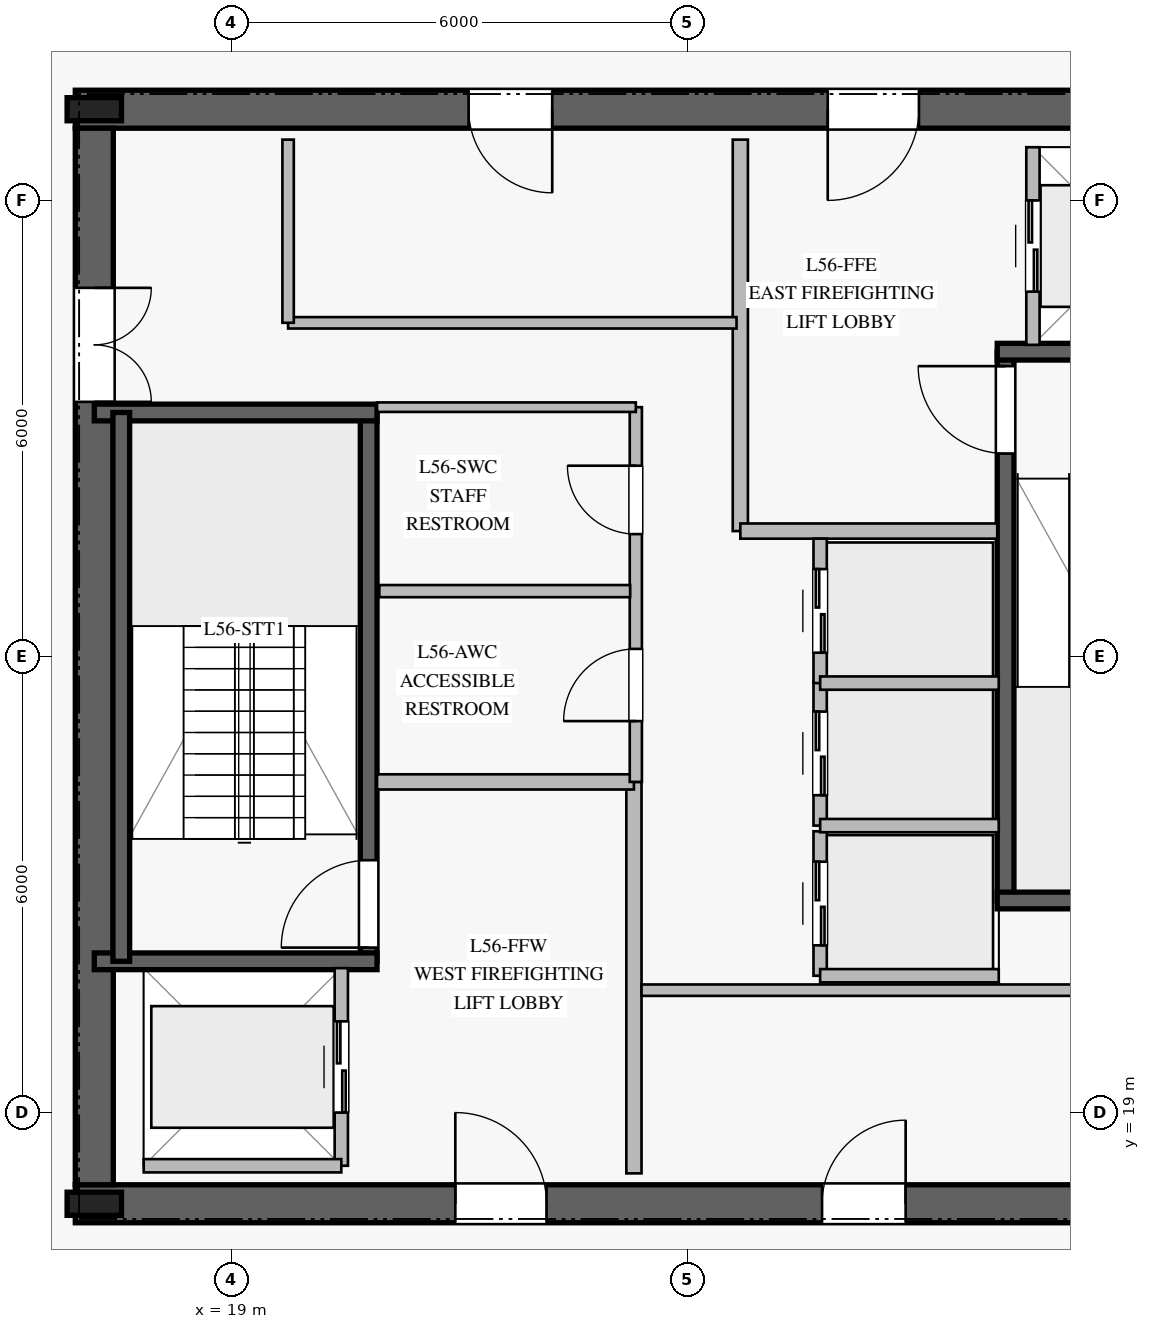
"""IFC4 building model, lengths in metres.
Left out: names, types, materials, properties, quantities, classifications, styles, units other than length and angle.
Written with IfcOpenShell. Run it as: python <this file> out.ifc"""

import sys

from ifc_helpers import new_model, si_unit, direction, frame, frame_2d, origin, origin_2d, place, context, subcontext, project, spatial, rectangle, i_section, extrude, element, fill, save


model = new_model("IFC4")
c1 = context("Model", 3, precision=1e-05, world=origin(), true_north=direction((0.0, 1.0)))
c2 = subcontext(c1, "Body", "Model", "MODEL_VIEW")
j1 = project(units=[si_unit("LENGTHUNIT", "METRE"), si_unit("PLANEANGLEUNIT", "RADIAN")], contexts=[c1])
p1 = place(None, origin())
s1 = spatial("IfcSite", under=j1, at=p1, CompositionType="ELEMENT")
p2 = place(p1, origin())
s2 = spatial("IfcBuilding", under=s1, at=p2, CompositionType="ELEMENT")
p3 = place(p2, frame((0.0, 0.0, 232.8)))
s3 = spatial("IfcBuildingStorey", under=s2, at=p3, CompositionType="ELEMENT", Elevation=232.8)
p4 = place(p3, frame((16.95, 17.8, 0.0), z_axis=(0.0, 0.0, 1.0), x_axis=(1.0, 0.0, 0.0)))
e1 = element("IfcWall", 1, at=p4, inside=s3, PredefinedType="SHEAR", context=c2, shape_type="SweptSolid", body=[
    extrude(rectangle(XDim=16.1, YDim=0.5, at=frame_2d((8.05, 0.0))), origin(), (0.0, 0.0, 1.0), 3.78),
])
p5 = place(p4, frame((5.0, 0.0, 0.0)))
e2 = element("IfcOpeningElement", 2, at=p5, cuts=e1, PredefinedType="OPENING", context=c2, shape_type="SweptSolid", body=[
    extrude(rectangle(XDim=1.2, YDim=2.25, at=frame_2d((0.6, 1.125))), frame((0.0, 0.26, 0.0), z_axis=(0.0, -1.0, 0.0), x_axis=(1.0, 0.0, 0.0)), (0.0, 0.0, 1.0), 0.52),
])
p6 = place(p4, frame((13.95, 0.0, 0.0)))
e3 = element("IfcOpeningElement", 3, at=p6, cuts=e1, PredefinedType="OPENING", context=c2, shape_type="SweptSolid", body=[
    extrude(rectangle(XDim=0.9, YDim=2.1, at=frame_2d((0.45, 1.05))), frame((0.0, 0.26, 0.0), z_axis=(0.0, -1.0, 0.0), x_axis=(1.0, 0.0, 0.0)), (0.0, 0.0, 1.0), 0.52),
])
p7 = place(p4, frame((9.825, 0.0, 0.0)))
e4 = element("IfcOpeningElement", 4, at=p7, cuts=e1, PredefinedType="OPENING", context=c2, shape_type="SweptSolid", body=[
    extrude(rectangle(XDim=1.1, YDim=2.2, at=frame_2d((0.55, 1.1))), frame((0.0, 0.26, 0.0), z_axis=(0.0, -1.0, 0.0), x_axis=(1.0, 0.0, 0.0)), (0.0, 0.0, 1.0), 0.52),
])
p8 = place(p3, frame((33.05, 32.2, 0.0), z_axis=(0.0, 0.0, 1.0), x_axis=(-1.0, 0.0, 0.0)))
e5 = element("IfcWall", 5, at=p8, inside=s3, PredefinedType="SHEAR", context=c2, shape_type="SweptSolid", body=[
    extrude(rectangle(XDim=16.1, YDim=0.5, at=frame_2d((8.05, 0.0))), origin(), (0.0, 0.0, 1.0), 3.78),
])
p9 = place(p8, frame((5.0, 0.0, 0.0)))
e6 = element("IfcOpeningElement", 6, at=p9, cuts=e5, PredefinedType="OPENING", context=c2, shape_type="SweptSolid", body=[
    extrude(rectangle(XDim=1.2, YDim=2.25, at=frame_2d((0.6, 1.125))), frame((0.0, 0.26, 0.0), z_axis=(0.0, -1.0, 0.0), x_axis=(1.0, 0.0, 0.0)), (0.0, 0.0, 1.0), 0.52),
])
p10 = place(p8, frame((9.825, 0.0, 0.0)))
e7 = element("IfcOpeningElement", 7, at=p10, cuts=e5, PredefinedType="OPENING", context=c2, shape_type="SweptSolid", body=[
    extrude(rectangle(XDim=1.1, YDim=2.2, at=frame_2d((0.55, 1.1))), frame((0.0, 0.26, 0.0), z_axis=(0.0, -1.0, 0.0), x_axis=(1.0, 0.0, 0.0)), (0.0, 0.0, 1.0), 0.52),
])
p11 = place(p3, frame((17.2, 31.95, 0.0), z_axis=(0.0, 0.0, 1.0), x_axis=(0.0, -1.0, 0.0)))
e8 = element("IfcWall", 8, at=p11, inside=s3, PredefinedType="SHEAR", context=c2, shape_type="SweptSolid", body=[
    extrude(rectangle(XDim=13.9, YDim=0.5, at=frame_2d((6.95, 0.0))), origin(), (0.0, 0.0, 1.0), 3.78),
])
p12 = place(p11, frame((2.1, 0.0, 0.0)))
e9 = element("IfcOpeningElement", 9, at=p12, cuts=e8, PredefinedType="OPENING", context=c2, shape_type="SweptSolid", body=[
    extrude(rectangle(XDim=1.5, YDim=2.2, at=frame_2d((0.75, 1.1))), frame((0.0, 0.26, 0.0), z_axis=(0.0, -1.0, 0.0), x_axis=(1.0, 0.0, 0.0)), (0.0, 0.0, 1.0), 0.52),
])
for number, where, z_axis, x_axis in (
    (10, (17.2, 17.8, 0.0), (0.0, 0.0, 1.0), (1.0, 0.0, 0.0)),
    (11, (17.2, 32.2, 0.0), (0.0, 0.0, 1.0), (1.0, 0.0, 0.0)),
):
    element("IfcColumn", number, at=place(p3, frame(where, z_axis=z_axis, x_axis=x_axis)), inside=s3, PredefinedType="COLUMN", context=c2, shape_type="SweptSolid", body=[
        extrude(i_section(OverallWidth=0.304, OverallDepth=0.716, WebThickness=0.021, FlangeThickness=0.04, at=origin_2d()), origin(), (0.0, 0.0, 1.0), 4.0),
    ])
p13 = place(p3, frame((20.81, 20.99, 0.0), z_axis=(0.0, 0.0, 1.0), x_axis=(0.0, 1.0, 0.0)))
e12 = element("IfcWall", 12, at=p13, inside=s3, PredefinedType="SOLIDWALL", context=c2, shape_type="SweptSolid", body=[
    extrude(rectangle(XDim=7.22, YDim=0.22, at=frame_2d((3.61, 0.0))), origin(), (0.0, 0.0, 1.0), 3.78),
])
p14 = place(p13, frame((0.18, 0.0, 0.0)))
e13 = element("IfcOpeningElement", 13, at=p14, cuts=e12, PredefinedType="OPENING", context=c2, shape_type="SweptSolid", body=[
    extrude(rectangle(XDim=1.15, YDim=2.2, at=frame_2d((0.575, 1.1))), frame((0.0, 0.12, 0.0), z_axis=(0.0, -1.0, 0.0), x_axis=(1.0, 0.0, 0.0)), (0.0, 0.0, 1.0), 0.24),
])
for number, where, z_axis, x_axis in (
    (14, (17.2, 20.99, 0.0), (0.0, 0.0, 1.0), (1.0, 0.0, 0.0)),
    (15, (17.2, 28.21, 0.0), (0.0, 0.0, 1.0), (1.0, 0.0, 0.0)),
):
    element("IfcWall", number, at=place(p3, frame(where, z_axis=z_axis, x_axis=x_axis)), inside=s3, PredefinedType="SOLIDWALL", context=c2, shape_type="SweptSolid", body=[
        extrude(rectangle(XDim=3.72, YDim=0.22, at=frame_2d((1.86, 0.0))), origin(), (0.0, 0.0, 1.0), 3.78),
    ])
p15 = place(p3, frame((17.555, 28.21, 0.0), z_axis=(0.0, 0.0, 1.0), x_axis=(0.0, -1.0, 0.0)))
e16 = element("IfcWall", 16, at=p15, inside=s3, PredefinedType="SOLIDWALL", context=c2, shape_type="SweptSolid", body=[
    extrude(rectangle(XDim=7.22, YDim=0.22, at=frame_2d((3.61, 0.0))), origin(), (0.0, 0.0, 1.0), 3.78),
])
p16 = place(p3, frame((29.19, 21.79, 0.0), z_axis=(0.0, 0.0, 1.0), x_axis=(0.0, 1.0, 0.0)))
e17 = element("IfcWall", 17, at=p16, inside=s3, PredefinedType="SOLIDWALL", context=c2, shape_type="SweptSolid", body=[
    extrude(rectangle(XDim=7.22, YDim=0.22, at=frame_2d((3.61, 0.0))), origin(), (0.0, 0.0, 1.0), 3.78),
])
p17 = place(p16, frame((5.88, 0.0, 0.0)))
e18 = element("IfcOpeningElement", 18, at=p17, cuts=e17, PredefinedType="OPENING", context=c2, shape_type="SweptSolid", body=[
    extrude(rectangle(XDim=1.15, YDim=2.2, at=frame_2d((0.575, 1.1))), frame((0.0, 0.12, 0.0), z_axis=(0.0, -1.0, 0.0), x_axis=(1.0, 0.0, 0.0)), (0.0, 0.0, 1.0), 0.24),
])
for number, where, z_axis, x_axis in (
    (19, (29.08, 21.79, 0.0), (0.0, 0.0, 1.0), (1.0, 0.0, 0.0)),
    (20, (29.08, 29.01, 0.0), (0.0, 0.0, 1.0), (1.0, 0.0, 0.0)),
):
    element("IfcWall", number, at=place(p3, frame(where, z_axis=z_axis, x_axis=x_axis)), inside=s3, PredefinedType="SOLIDWALL", context=c2, shape_type="SweptSolid", body=[
        extrude(rectangle(XDim=3.72, YDim=0.22, at=frame_2d((1.86, 0.0))), origin(), (0.0, 0.0, 1.0), 3.78),
    ])
p18 = place(p3, frame((24.3, 18.2, 0.0), z_axis=(0.0, 0.0, 1.0), x_axis=(0.0, 1.0, 0.0)))
e21 = element("IfcWall", 21, at=p18, inside=s3, PredefinedType="PARTITIONING", context=c2, shape_type="SweptSolid", body=[
    extrude(rectangle(XDim=5.15, YDim=0.2, at=frame_2d((2.575, 0.0))), origin(), (0.0, 0.0, 1.0), 3.78),
])
p19 = place(p3, frame((20.92, 23.35, 0.0), z_axis=(0.0, 0.0, 1.0), x_axis=(1.0, 0.0, 0.0)))
e22 = element("IfcWall", 22, at=p19, inside=s3, PredefinedType="PARTITIONING", context=c2, shape_type="SweptSolid", body=[
    extrude(rectangle(XDim=3.38, YDim=0.2, at=frame_2d((1.69, 0.0))), origin(), (0.0, 0.0, 1.0), 3.78),
])
p20 = place(p3, frame((25.7, 26.65, 0.0), z_axis=(0.0, 0.0, 1.0), x_axis=(0.0, 1.0, 0.0)))
e23 = element("IfcWall", 23, at=p20, inside=s3, PredefinedType="PARTITIONING", context=c2, shape_type="SweptSolid", body=[
    extrude(rectangle(XDim=5.15, YDim=0.2, at=frame_2d((2.575, 0.0))), origin(), (0.0, 0.0, 1.0), 3.78),
])
p21 = place(p3, frame((25.7, 26.65, 0.0), z_axis=(0.0, 0.0, 1.0), x_axis=(1.0, 0.0, 0.0)))
e24 = element("IfcWall", 24, at=p21, inside=s3, PredefinedType="PARTITIONING", context=c2, shape_type="SweptSolid", body=[
    extrude(rectangle(XDim=3.38, YDim=0.2, at=frame_2d((1.69, 0.0))), origin(), (0.0, 0.0, 1.0), 3.78),
])
p22 = place(p3, frame((24.325, 23.35, 0.0), z_axis=(0.0, 0.0, 1.0), x_axis=(0.0, 1.0, 0.0)))
e25 = element("IfcWall", 25, at=p22, inside=s3, PredefinedType="PLUMBINGWALL", context=c2, shape_type="SweptSolid", body=[
    extrude(rectangle(XDim=4.93, YDim=0.16, at=frame_2d((2.465, 0.0))), origin(), (0.0, 0.0, 1.0), 3.78),
])
p23 = place(p22, frame((0.8, 0.0, 0.0)))
e26 = element("IfcOpeningElement", 26, at=p23, cuts=e25, PredefinedType="OPENING", context=c2, shape_type="SweptSolid", body=[
    extrude(rectangle(XDim=0.95, YDim=2.1, at=frame_2d((0.475, 1.05))), frame((0.0, 0.09, 0.0), z_axis=(0.0, -1.0, 0.0), x_axis=(1.0, 0.0, 0.0)), (0.0, 0.0, 1.0), 0.18),
])
p24 = place(p22, frame((3.26, 0.0, 0.0)))
e27 = element("IfcOpeningElement", 27, at=p24, cuts=e25, PredefinedType="OPENING", context=c2, shape_type="SweptSolid", body=[
    extrude(rectangle(XDim=0.9, YDim=2.1, at=frame_2d((0.45, 1.05))), frame((0.0, 0.09, 0.0), z_axis=(0.0, -1.0, 0.0), x_axis=(1.0, 0.0, 0.0)), (0.0, 0.0, 1.0), 0.18),
])
p25 = place(p3, frame((20.92, 28.28, 0.0), z_axis=(0.0, 0.0, 1.0), x_axis=(1.0, 0.0, 0.0)))
e28 = element("IfcWall", 28, at=p25, inside=s3, PredefinedType="PARTITIONING", context=c2, shape_type="SweptSolid", body=[
    extrude(rectangle(XDim=3.405, YDim=0.125, at=frame_2d((1.703, 0.0))), origin(), (0.0, 0.0, 1.0), 3.78),
])
p26 = place(p3, frame((20.95, 25.86, 0.0), z_axis=(0.0, 0.0, 1.0), x_axis=(1.0, 0.0, 0.0)))
e29 = element("IfcWall", 29, at=p26, inside=s3, PredefinedType="PLUMBINGWALL", context=c2, shape_type="SweptSolid", body=[
    extrude(rectangle(XDim=3.3, YDim=0.16, at=frame_2d((1.65, 0.0))), origin(), (0.0, 0.0, 1.0), 3.78),
])
p27 = place(p3, frame((24.4, 20.61, 0.0), z_axis=(0.0, 0.0, 1.0), x_axis=(1.0, 0.0, 0.0)))
e30 = element("IfcWall", 30, at=p27, inside=s3, PredefinedType="PARTITIONING", context=c2, shape_type="SweptSolid", body=[
    extrude(rectangle(XDim=5.9, YDim=0.15, at=frame_2d((2.95, 0.0))), origin(), (0.0, 0.0, 1.0), 3.78),
])
p28 = place(p3, frame((19.75, 29.39, 0.0), z_axis=(0.0, 0.0, 1.0), x_axis=(1.0, 0.0, 0.0)))
e31 = element("IfcWall", 31, at=p28, inside=s3, PredefinedType="PARTITIONING", context=c2, shape_type="SweptSolid", body=[
    extrude(rectangle(XDim=5.9, YDim=0.15, at=frame_2d((2.95, 0.0))), origin(), (0.0, 0.0, 1.0), 3.78),
])
p29 = place(p3, frame((19.75, 29.39, 0.0), z_axis=(0.0, 0.0, 1.0), x_axis=(0.0, 1.0, 0.0)))
e32 = element("IfcWall", 32, at=p29, inside=s3, PredefinedType="PARTITIONING", context=c2, shape_type="SweptSolid", body=[
    extrude(rectangle(XDim=2.41, YDim=0.15, at=frame_2d((1.205, 0.0))), origin(), (0.0, 0.0, 1.0), 3.78),
])
p30 = place(p3, frame((26.75, 20.8, 0.0), z_axis=(0.0, 0.0, 1.0), x_axis=(0.0, 1.0, 0.0)))
e33 = element("IfcWall", 33, at=p30, inside=s3, PredefinedType="PARTITIONING", context=c2, shape_type="SweptSolid", body=[
    extrude(rectangle(XDim=1.9, YDim=0.175, at=frame_2d((0.95, 0.0))), origin(), (0.0, 0.0, 1.0), 3.78),
])
p31 = place(p30, frame((0.4, 0.0, 0.0)))
e34 = element("IfcOpeningElement", 34, at=p31, cuts=e33, PredefinedType="OPENING", context=c2, shape_type="SweptSolid", body=[
    extrude(rectangle(XDim=1.1, YDim=2.2, at=frame_2d((0.55, 1.1))), frame((0.0, 0.098, 0.0), z_axis=(0.0, -1.0, 0.0), x_axis=(1.0, 0.0, 0.0)), (0.0, 0.0, 1.0), 0.195),
])
p32 = place(p3, frame((26.75, 20.8, 0.0), z_axis=(0.0, 0.0, 1.0), x_axis=(1.0, 0.0, 0.0)))
e35 = element("IfcWall", 35, at=p32, inside=s3, PredefinedType="PARTITIONING", context=c2, shape_type="SweptSolid", body=[
    extrude(rectangle(XDim=2.35, YDim=0.175, at=frame_2d((1.175, 0.0))), origin(), (0.0, 0.0, 1.0), 3.78),
])
p33 = place(p3, frame((26.75, 22.775, 0.0), z_axis=(0.0, 0.0, 1.0), x_axis=(0.0, 1.0, 0.0)))
e36 = element("IfcWall", 36, at=p33, inside=s3, PredefinedType="PARTITIONING", context=c2, shape_type="SweptSolid", body=[
    extrude(rectangle(XDim=1.9, YDim=0.175, at=frame_2d((0.95, 0.0))), origin(), (0.0, 0.0, 1.0), 3.78),
])
p34 = place(p33, frame((0.4, 0.0, 0.0)))
e37 = element("IfcOpeningElement", 37, at=p34, cuts=e36, PredefinedType="OPENING", context=c2, shape_type="SweptSolid", body=[
    extrude(rectangle(XDim=1.1, YDim=2.2, at=frame_2d((0.55, 1.1))), frame((0.0, 0.098, 0.0), z_axis=(0.0, -1.0, 0.0), x_axis=(1.0, 0.0, 0.0)), (0.0, 0.0, 1.0), 0.195),
])
p35 = place(p3, frame((26.75, 22.775, 0.0), z_axis=(0.0, 0.0, 1.0), x_axis=(1.0, 0.0, 0.0)))
e38 = element("IfcWall", 38, at=p35, inside=s3, PredefinedType="PARTITIONING", context=c2, shape_type="SweptSolid", body=[
    extrude(rectangle(XDim=2.35, YDim=0.175, at=frame_2d((1.175, 0.0))), origin(), (0.0, 0.0, 1.0), 3.78),
])
p36 = place(p3, frame((26.75, 24.65, 0.0), z_axis=(0.0, 0.0, 1.0), x_axis=(0.0, 1.0, 0.0)))
e39 = element("IfcWall", 39, at=p36, inside=s3, PredefinedType="PARTITIONING", context=c2, shape_type="SweptSolid", body=[
    extrude(rectangle(XDim=1.9, YDim=0.175, at=frame_2d((0.95, 0.0))), origin(), (0.0, 0.0, 1.0), 3.78),
])
p37 = place(p36, frame((0.4, 0.0, 0.0)))
e40 = element("IfcOpeningElement", 40, at=p37, cuts=e39, PredefinedType="OPENING", context=c2, shape_type="SweptSolid", body=[
    extrude(rectangle(XDim=1.1, YDim=2.2, at=frame_2d((0.55, 1.1))), frame((0.0, 0.098, 0.0), z_axis=(0.0, -1.0, 0.0), x_axis=(1.0, 0.0, 0.0)), (0.0, 0.0, 1.0), 0.195),
])
p38 = place(p3, frame((26.75, 24.65, 0.0), z_axis=(0.0, 0.0, 1.0), x_axis=(1.0, 0.0, 0.0)))
e41 = element("IfcWall", 41, at=p38, inside=s3, PredefinedType="PARTITIONING", context=c2, shape_type="SweptSolid", body=[
    extrude(rectangle(XDim=2.35, YDim=0.175, at=frame_2d((1.175, 0.0))), origin(), (0.0, 0.0, 1.0), 3.78),
])
p39 = place(p3, frame((20.45, 18.3, 0.0), z_axis=(0.0, 0.0, 1.0), x_axis=(0.0, 1.0, 0.0)))
e42 = element("IfcWall", 42, at=p39, inside=s3, PredefinedType="PARTITIONING", context=c2, shape_type="SweptSolid", body=[
    extrude(rectangle(XDim=2.6, YDim=0.175, at=frame_2d((1.3, 0.0))), origin(), (0.0, 0.0, 1.0), 3.78),
])
p40 = place(p39, frame((0.7, 0.0, 0.0)))
e43 = element("IfcOpeningElement", 43, at=p40, cuts=e42, PredefinedType="OPENING", context=c2, shape_type="SweptSolid", body=[
    extrude(rectangle(XDim=1.2, YDim=2.2, at=frame_2d((0.6, 1.1))), frame((0.0, 0.098, 0.0), z_axis=(0.0, -1.0, 0.0), x_axis=(1.0, 0.0, 0.0)), (0.0, 0.0, 1.0), 0.195),
])
p41 = place(p3, frame((17.85, 18.3, 0.0), z_axis=(0.0, 0.0, 1.0), x_axis=(1.0, 0.0, 0.0)))
e44 = element("IfcWall", 44, at=p41, inside=s3, PredefinedType="PARTITIONING", context=c2, shape_type="SweptSolid", body=[
    extrude(rectangle(XDim=2.6, YDim=0.175, at=frame_2d((1.3, 0.0))), origin(), (0.0, 0.0, 1.0), 3.78),
])
p42 = place(p3, frame((29.55, 29.1, 0.0), z_axis=(0.0, 0.0, 1.0), x_axis=(0.0, 1.0, 0.0)))
e45 = element("IfcWall", 45, at=p42, inside=s3, PredefinedType="PARTITIONING", context=c2, shape_type="SweptSolid", body=[
    extrude(rectangle(XDim=2.6, YDim=0.175, at=frame_2d((1.3, 0.0))), origin(), (0.0, 0.0, 1.0), 3.78),
])
p43 = place(p42, frame((0.7, 0.0, 0.0)))
e46 = element("IfcOpeningElement", 46, at=p43, cuts=e45, PredefinedType="OPENING", context=c2, shape_type="SweptSolid", body=[
    extrude(rectangle(XDim=1.2, YDim=2.2, at=frame_2d((0.6, 1.1))), frame((0.0, 0.098, 0.0), z_axis=(0.0, -1.0, 0.0), x_axis=(1.0, 0.0, 0.0)), (0.0, 0.0, 1.0), 0.195),
])
p44 = place(p14, origin())
e47 = element("IfcDoor", 47, at=p44, inside=s3, OperationType="SINGLE_SWING_LEFT", PredefinedType="DOOR", context=c2, shape_type="SweptSolid", body=[
    extrude(rectangle(XDim=1.15, YDim=2.2, at=frame_2d((0.575, 1.1))), frame((0.0, 0.025, 0.0), z_axis=(0.0, -1.0, 0.0), x_axis=(1.0, 0.0, 0.0)), (0.0, 0.0, 1.0), 0.05),
])
fill(e13, e47)
p45 = place(p17, origin())
e48 = element("IfcDoor", 48, at=p45, inside=s3, OperationType="SINGLE_SWING_RIGHT", PredefinedType="DOOR", context=c2, shape_type="SweptSolid", body=[
    extrude(rectangle(XDim=1.15, YDim=2.2, at=frame_2d((0.575, 1.1))), frame((0.0, 0.025, 0.0), z_axis=(0.0, -1.0, 0.0), x_axis=(1.0, 0.0, 0.0)), (0.0, 0.0, 1.0), 0.05),
])
fill(e18, e48)
p46 = place(p5, origin())
e49 = element("IfcDoor", 49, at=p46, inside=s3, OperationType="SINGLE_SWING_LEFT", PredefinedType="DOOR", context=c2, shape_type="SweptSolid", body=[
    extrude(rectangle(XDim=1.2, YDim=2.25, at=frame_2d((0.6, 1.125))), frame((0.0, 0.025, 0.0), z_axis=(0.0, -1.0, 0.0), x_axis=(1.0, 0.0, 0.0)), (0.0, 0.0, 1.0), 0.05),
])
fill(e2, e49)
p47 = place(p9, origin())
e50 = element("IfcDoor", 50, at=p47, inside=s3, OperationType="SINGLE_SWING_RIGHT", PredefinedType="DOOR", context=c2, shape_type="SweptSolid", body=[
    extrude(rectangle(XDim=1.2, YDim=2.25, at=frame_2d((0.6, 1.125))), frame((0.0, 0.025, 0.0), z_axis=(0.0, -1.0, 0.0), x_axis=(1.0, 0.0, 0.0)), (0.0, 0.0, 1.0), 0.05),
])
fill(e6, e50)
p48 = place(p12, origin())
e51 = element("IfcDoor", 51, at=p48, inside=s3, OperationType="DOUBLE_DOOR_SINGLE_SWING", PredefinedType="DOOR", context=c2, shape_type="SweptSolid", body=[
    extrude(rectangle(XDim=1.5, YDim=2.2, at=frame_2d((0.75, 1.1))), frame((0.0, 0.025, 0.0), z_axis=(0.0, -1.0, 0.0), x_axis=(1.0, 0.0, 0.0)), (0.0, 0.0, 1.0), 0.05),
])
fill(e9, e51)
p49 = place(p23, origin())
e52 = element("IfcDoor", 52, at=p49, inside=s3, OperationType="SINGLE_SWING_LEFT", PredefinedType="DOOR", context=c2, shape_type="SweptSolid", body=[
    extrude(rectangle(XDim=0.95, YDim=2.1, at=frame_2d((0.475, 1.05))), frame((0.0, 0.025, 0.0), z_axis=(0.0, -1.0, 0.0), x_axis=(1.0, 0.0, 0.0)), (0.0, 0.0, 1.0), 0.05),
])
fill(e26, e52)
p50 = place(p24, origin())
e53 = element("IfcDoor", 53, at=p50, inside=s3, OperationType="SINGLE_SWING_RIGHT", PredefinedType="DOOR", context=c2, shape_type="SweptSolid", body=[
    extrude(rectangle(XDim=0.9, YDim=2.1, at=frame_2d((0.45, 1.05))), frame((0.0, 0.025, 0.0), z_axis=(0.0, -1.0, 0.0), x_axis=(1.0, 0.0, 0.0)), (0.0, 0.0, 1.0), 0.05),
])
fill(e27, e53)
p51 = place(p7, origin())
e54 = element("IfcDoor", 54, at=p51, inside=s3, OperationType="SINGLE_SWING_RIGHT", PredefinedType="DOOR", context=c2, shape_type="SweptSolid", body=[
    extrude(rectangle(XDim=1.1, YDim=2.2, at=frame_2d((0.55, 1.1))), frame((0.0, 0.025, 0.0), z_axis=(0.0, -1.0, 0.0), x_axis=(1.0, 0.0, 0.0)), (0.0, 0.0, 1.0), 0.05),
])
fill(e4, e54)
p52 = place(p10, origin())
e55 = element("IfcDoor", 55, at=p52, inside=s3, OperationType="SINGLE_SWING_LEFT", PredefinedType="DOOR", context=c2, shape_type="SweptSolid", body=[
    extrude(rectangle(XDim=1.1, YDim=2.2, at=frame_2d((0.55, 1.1))), frame((0.0, 0.025, 0.0), z_axis=(0.0, -1.0, 0.0), x_axis=(1.0, 0.0, 0.0)), (0.0, 0.0, 1.0), 0.05),
])
fill(e7, e55)
p53 = place(p31, origin())
e56 = element("IfcDoor", 56, at=p53, inside=s3, OperationType="DOUBLE_DOOR_SLIDING", PredefinedType="DOOR", context=c2, shape_type="SweptSolid", body=[
    extrude(rectangle(XDim=1.1, YDim=2.2, at=frame_2d((0.55, 1.1))), frame((0.0, 0.025, 0.0), z_axis=(0.0, -1.0, 0.0), x_axis=(1.0, 0.0, 0.0)), (0.0, 0.0, 1.0), 0.05),
])
fill(e34, e56)
p54 = place(p34, origin())
e57 = element("IfcDoor", 57, at=p54, inside=s3, OperationType="DOUBLE_DOOR_SLIDING", PredefinedType="DOOR", context=c2, shape_type="SweptSolid", body=[
    extrude(rectangle(XDim=1.1, YDim=2.2, at=frame_2d((0.55, 1.1))), frame((0.0, 0.025, 0.0), z_axis=(0.0, -1.0, 0.0), x_axis=(1.0, 0.0, 0.0)), (0.0, 0.0, 1.0), 0.05),
])
fill(e37, e57)
p55 = place(p37, origin())
e58 = element("IfcDoor", 58, at=p55, inside=s3, OperationType="DOUBLE_DOOR_SLIDING", PredefinedType="DOOR", context=c2, shape_type="SweptSolid", body=[
    extrude(rectangle(XDim=1.1, YDim=2.2, at=frame_2d((0.55, 1.1))), frame((0.0, 0.025, 0.0), z_axis=(0.0, -1.0, 0.0), x_axis=(1.0, 0.0, 0.0)), (0.0, 0.0, 1.0), 0.05),
])
fill(e40, e58)
p56 = place(p40, origin())
e59 = element("IfcDoor", 59, at=p56, inside=s3, OperationType="DOUBLE_DOOR_SLIDING", PredefinedType="DOOR", context=c2, shape_type="SweptSolid", body=[
    extrude(rectangle(XDim=1.2, YDim=2.2, at=frame_2d((0.6, 1.1))), frame((0.0, 0.025, 0.0), z_axis=(0.0, -1.0, 0.0), x_axis=(1.0, 0.0, 0.0)), (0.0, 0.0, 1.0), 0.05),
])
fill(e43, e59)
p57 = place(p43, origin())
e60 = element("IfcDoor", 60, at=p57, inside=s3, OperationType="DOUBLE_DOOR_SLIDING", PredefinedType="DOOR", context=c2, shape_type="SweptSolid", body=[
    extrude(rectangle(XDim=1.2, YDim=2.2, at=frame_2d((0.6, 1.1))), frame((0.0, 0.025, 0.0), z_axis=(0.0, -1.0, 0.0), x_axis=(1.0, 0.0, 0.0)), (0.0, 0.0, 1.0), 0.05),
])
fill(e46, e60)
save(model, sys.argv[1])
